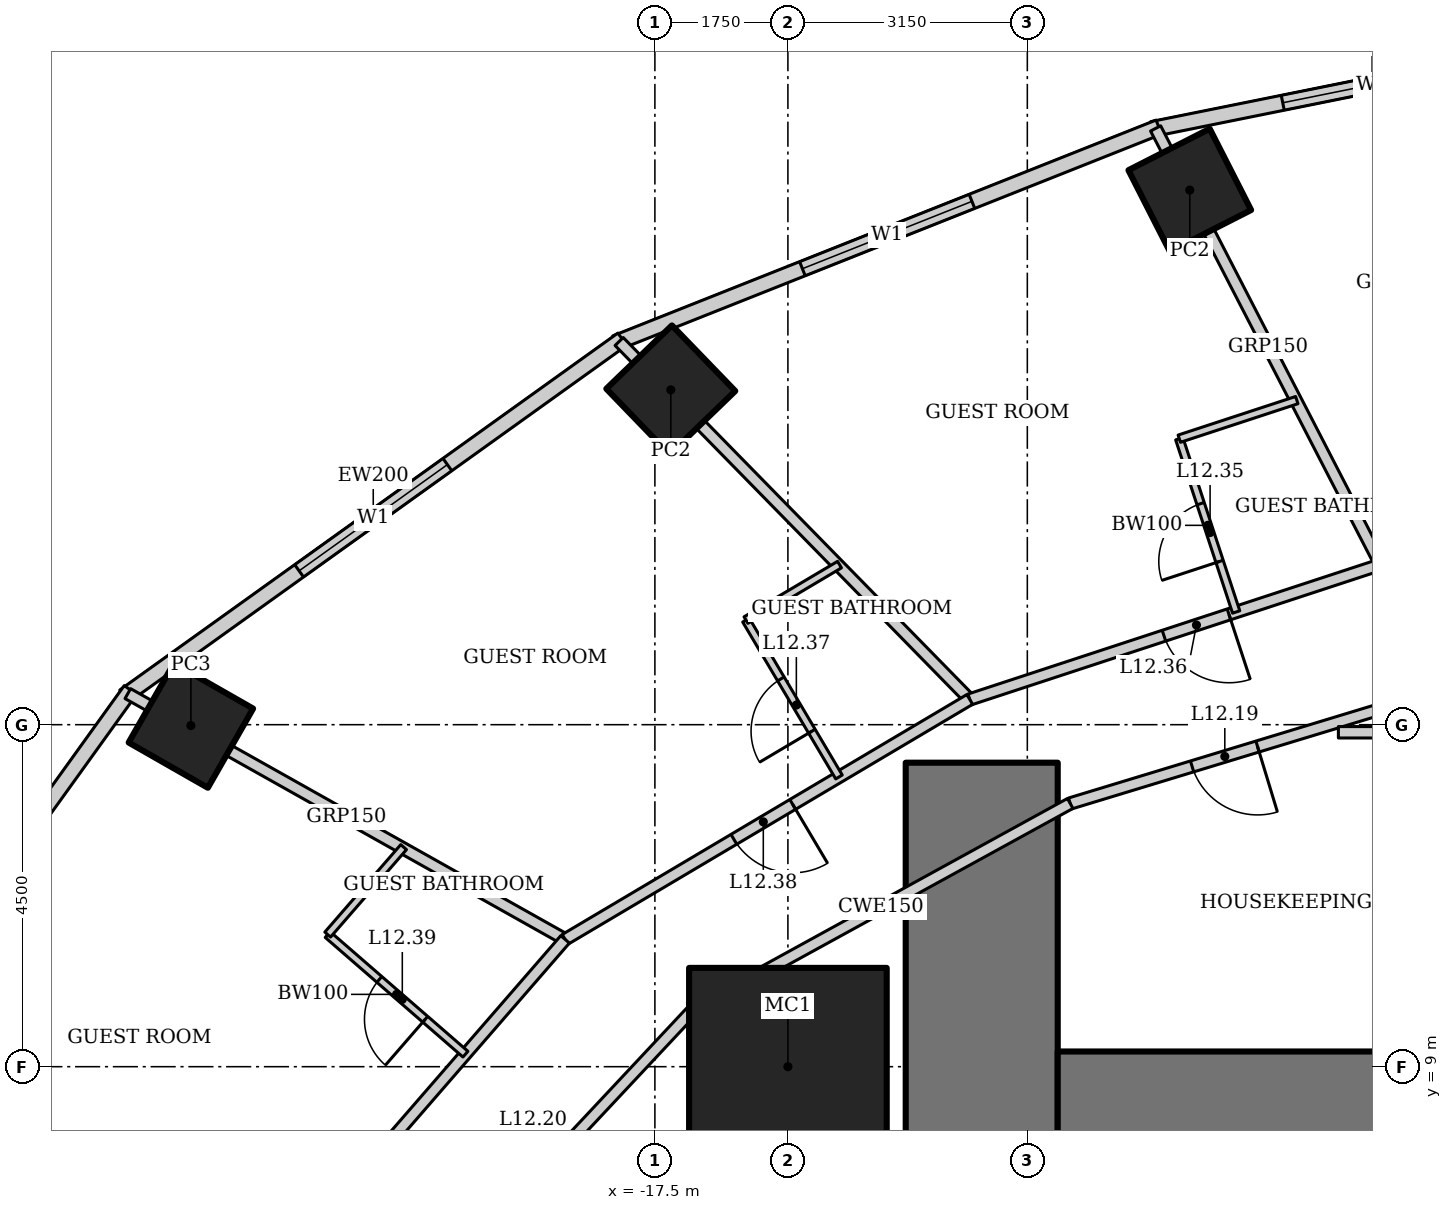
"""IFC4 building model, lengths in metres.
Left out: names, types, materials, properties, quantities, classifications, styles, units other than length and angle.
Written with IfcOpenShell. Run it as: python <this file> out.ifc"""

import sys

from ifc_helpers import new_model, si_unit, direction, frame, frame_2d, origin, origin_2d, place, context, subcontext, project, spatial, rectangle, hollow_rectangle, extrude, element, fill, save


model = new_model("IFC4")
c1 = context("Model", 3, precision=1e-05, world=origin(), true_north=direction((0.0, 1.0)))
c2 = subcontext(c1, "Body", "Model", "MODEL_VIEW")
j1 = project(units=[si_unit("LENGTHUNIT", "METRE"), si_unit("PLANEANGLEUNIT", "RADIAN")], contexts=[c1])
p1 = place(None, origin())
s1 = spatial("IfcSite", under=j1, at=p1, CompositionType="ELEMENT")
p2 = place(p1, origin())
s2 = spatial("IfcBuilding", under=s1, at=p2, CompositionType="ELEMENT")
p3 = place(p2, frame((0.0, 0.0, 58.6)))
s3 = spatial("IfcBuildingStorey", under=s2, at=p3, CompositionType="ELEMENT", Elevation=58.6)
p4 = place(p3, frame((-15.75, 9.0, 0.0), z_axis=(0.0, 0.0, 1.0), x_axis=(1.0, 0.0, 0.0)))
e1 = element("IfcColumn", 1, at=p4, inside=s3, PredefinedType="COLUMN", context=c2, shape_type="SweptSolid", body=[
    extrude(hollow_rectangle(XDim=2.6, YDim=2.6, WallThickness=0.13, at=origin_2d()), origin(), (0.0, 0.0, 1.0), 3.6),
])
for number, where, z_axis, x_axis in (
    (2, (-10.463, 20.534, 0.0), (0.0, 0.0, 1.0), (0.891, 0.454, 0.0)),
    (3, (-17.291, 17.905, 0.0), (0.0, 0.0, 1.0), (0.719, 0.695, 0.0)),
):
    element("IfcColumn", number, at=place(p3, frame(where, z_axis=z_axis, x_axis=x_axis)), inside=s3, PredefinedType="COLUMN", context=c2, shape_type="SweptSolid", body=[
        extrude(hollow_rectangle(XDim=1.2, YDim=1.2, WallThickness=0.1, at=origin_2d()), origin(), (0.0, 0.0, 1.0), 3.6),
    ])
p5 = place(p3, frame((-23.605, 13.489, 0.0), z_axis=(0.0, 0.0, 1.0), x_axis=(0.496139221777, 0.86824298017, 0.0)))
e4 = element("IfcColumn", 4, at=p5, inside=s3, PredefinedType="COLUMN", context=c2, shape_type="SweptSolid", body=[
    extrude(hollow_rectangle(XDim=1.2, YDim=1.2, WallThickness=0.12, at=origin_2d()), origin(), (0.0, 0.0, 1.0), 3.6),
])
p6 = place(p3, frame((-13.2, 13.0, 0.0), z_axis=(0.0, 0.0, 1.0), x_axis=(0.0, -1.0, 0.0)))
e5 = element("IfcWall", 5, at=p6, inside=s3, PredefinedType="SHEAR", context=c2, shape_type="SweptSolid", body=[
    extrude(rectangle(XDim=26.0, YDim=2.0, at=frame_2d((13.0, 0.0))), origin(), (0.0, 0.0, 1.0), 3.6),
])
p7 = place(p6, frame((12.1, 0.0, 0.0)))
e6 = element("IfcOpeningElement", 6, at=p7, cuts=e5, PredefinedType="OPENING", context=c2, shape_type="SweptSolid", body=[
    extrude(rectangle(XDim=1.8, YDim=2.1, at=frame_2d((0.9, 1.05))), frame((0.0, 1.01, 0.0), z_axis=(0.0, -1.0, 0.0), x_axis=(1.0, 0.0, 0.0)), (0.0, 0.0, 1.0), 2.02),
])
p8 = place(p3, frame((12.2, 8.0, 0.0), z_axis=(0.0, 0.0, 1.0), x_axis=(-1.0, 0.0, 0.0)))
e7 = element("IfcWall", 7, at=p8, inside=s3, PredefinedType="SHEAR", context=c2, shape_type="SweptSolid", body=[
    extrude(rectangle(XDim=24.4, YDim=2.4, at=frame_2d((12.2, 0.0))), origin(), (0.0, 0.0, 1.0), 3.6),
])
p9 = place(p3, frame((-5.17, 22.504, 0.0), z_axis=(0.0, 0.0, 1.0), x_axis=(-0.980251657452, -0.197754110105, 0.0)))
e8 = element("IfcWall", 8, at=p9, inside=s3, PredefinedType="SOLIDWALL", context=c2, shape_type="SweptSolid", body=[
    extrude(rectangle(XDim=5.904, YDim=0.2, at=frame_2d((2.952, 0.0))), origin(), (0.0, 0.0, 1.0), 3.45),
])
p10 = place(p9, frame((1.752, 0.0, 0.5)))
e9 = element("IfcOpeningElement", 9, at=p10, cuts=e8, PredefinedType="OPENING", context=c2, shape_type="SweptSolid", body=[
    extrude(rectangle(XDim=2.4, YDim=2.2, at=frame_2d((1.2, 1.1))), frame((0.0, 0.11, 0.0), z_axis=(0.0, -1.0, 0.0), x_axis=(1.0, 0.0, 0.0)), (0.0, 0.0, 1.0), 0.22),
])
p11 = place(p3, frame((-10.869, 21.363, 0.0), z_axis=(0.0, 0.0, 1.0), x_axis=(-0.929358351251, -0.369178892895, 0.0)))
e10 = element("IfcWall", 10, at=p11, inside=s3, PredefinedType="SOLIDWALL", context=c2, shape_type="SweptSolid", body=[
    extrude(rectangle(XDim=7.692, YDim=0.2, at=frame_2d((3.846, 0.0))), origin(), (0.0, 0.0, 1.0), 3.45),
])
p12 = place(p11, frame((2.646, 0.0, 0.5)))
e11 = element("IfcOpeningElement", 11, at=p12, cuts=e10, PredefinedType="OPENING", context=c2, shape_type="SweptSolid", body=[
    extrude(rectangle(XDim=2.4, YDim=2.2, at=frame_2d((1.2, 1.1))), frame((0.0, 0.11, 0.0), z_axis=(0.0, -1.0, 0.0), x_axis=(1.0, 0.0, 0.0)), (0.0, 0.0, 1.0), 0.22),
])
p13 = place(p3, frame((-17.929, 18.572, 0.0), z_axis=(0.0, 0.0, 1.0), x_axis=(-0.812791321576, -0.582554948112, 0.0)))
e12 = element("IfcWall", 12, at=p13, inside=s3, PredefinedType="SOLIDWALL", context=c2, shape_type="SweptSolid", body=[
    extrude(rectangle(XDim=8.063, YDim=0.2, at=frame_2d((4.032, 0.0))), origin(), (0.0, 0.0, 1.0), 3.45),
])
p14 = place(p13, frame((2.832, 0.0, 0.5)))
e13 = element("IfcOpeningElement", 13, at=p14, cuts=e12, PredefinedType="OPENING", context=c2, shape_type="SweptSolid", body=[
    extrude(rectangle(XDim=2.4, YDim=2.2, at=frame_2d((1.2, 1.1))), frame((0.0, 0.11, 0.0), z_axis=(0.0, -1.0, 0.0), x_axis=(1.0, 0.0, 0.0)), (0.0, 0.0, 1.0), 0.22),
])
p15 = place(p3, frame((-24.4, 13.957, 0.0), z_axis=(0.0, 0.0, 1.0), x_axis=(-0.583937613703, -0.811798536155, 0.0)))
e14 = element("IfcWall", 14, at=p15, inside=s3, PredefinedType="SOLIDWALL", context=c2, shape_type="SweptSolid", body=[
    extrude(rectangle(XDim=8.323, YDim=0.2, at=frame_2d((4.162, 0.0))), origin(), (0.0, 0.0, 1.0), 3.45),
])
p16 = place(p15, frame((2.961, 0.0, 0.5)))
e15 = element("IfcOpeningElement", 15, at=p16, cuts=e14, PredefinedType="OPENING", context=c2, shape_type="SweptSolid", body=[
    extrude(rectangle(XDim=2.4, YDim=2.2, at=frame_2d((1.2, 1.1))), frame((0.0, 0.11, 0.0), z_axis=(0.0, -1.0, 0.0), x_axis=(1.0, 0.0, 0.0)), (0.0, 0.0, 1.0), 0.22),
])
p17 = place(p3, frame((-10.912, 21.346, 0.0), z_axis=(0.0, 0.0, 1.0), x_axis=(0.458384799126, -0.888753833145, 0.0)))
e16 = element("IfcWall", 16, at=p17, inside=s3, PredefinedType="PARTITIONING", context=c2, shape_type="SweptSolid", body=[
    extrude(rectangle(XDim=6.457, YDim=0.15, at=frame_2d((3.229, 0.0))), origin(), (0.0, 0.0, 1.0), 2.528),
])
p18 = place(p3, frame((-17.97, 18.542, 0.0), z_axis=(0.0, 0.0, 1.0), x_axis=(0.699736251994, -0.714401272147, 0.0)))
e17 = element("IfcWall", 17, at=p18, inside=s3, PredefinedType="PARTITIONING", context=c2, shape_type="SweptSolid", body=[
    extrude(rectangle(XDim=6.593, YDim=0.15, at=frame_2d((3.296, 0.0))), origin(), (0.0, 0.0, 1.0), 2.528),
])
p19 = place(p3, frame((-24.435, 13.909, 0.0), z_axis=(0.0, 0.0, 1.0), x_axis=(0.871747379892, -0.489955616001, 0.0)))
e18 = element("IfcWall", 18, at=p19, inside=s3, PredefinedType="PARTITIONING", context=c2, shape_type="SweptSolid", body=[
    extrude(rectangle(XDim=6.6, YDim=0.15, at=frame_2d((3.3, 0.0))), origin(), (0.0, 0.0, 1.0), 2.693),
])
p20 = place(p3, frame((-7.952, 15.607, 0.0), z_axis=(0.0, 0.0, 1.0), x_axis=(-0.950106803111, -0.311924770869, 0.0)))
e19 = element("IfcWall", 19, at=p20, inside=s3, PredefinedType="PARTITIONING", context=c2, shape_type="SweptSolid", body=[
    extrude(rectangle(XDim=5.689, YDim=0.15, at=frame_2d((2.845, 0.0))), origin(), (0.0, 0.0, 1.0), 3.45),
])
p21 = place(p20, frame((2.1, 0.0, 0.0)))
e20 = element("IfcOpeningElement", 20, at=p21, cuts=e19, PredefinedType="OPENING", context=c2, shape_type="SweptSolid", body=[
    extrude(rectangle(XDim=0.9, YDim=2.1, at=frame_2d((0.45, 1.05))), frame((0.0, 0.085, 0.0), z_axis=(0.0, -1.0, 0.0), x_axis=(1.0, 0.0, 0.0)), (0.0, 0.0, 1.0), 0.17),
])
p22 = place(p3, frame((-13.357, 13.832, 0.0), z_axis=(0.0, 0.0, 1.0), x_axis=(-0.860147339762, -0.510045639036, 0.0)))
e21 = element("IfcWall", 21, at=p22, inside=s3, PredefinedType="PARTITIONING", context=c2, shape_type="SweptSolid", body=[
    extrude(rectangle(XDim=6.19, YDim=0.15, at=frame_2d((3.095, 0.0))), origin(), (0.0, 0.0, 1.0), 3.45),
])
p23 = place(p22, frame((2.708, 0.0, 0.0)))
e22 = element("IfcOpeningElement", 22, at=p23, cuts=e21, PredefinedType="OPENING", context=c2, shape_type="SweptSolid", body=[
    extrude(rectangle(XDim=0.9, YDim=2.1, at=frame_2d((0.45, 1.05))), frame((0.0, 0.085, 0.0), z_axis=(0.0, -1.0, 0.0), x_axis=(1.0, 0.0, 0.0)), (0.0, 0.0, 1.0), 0.17),
])
p24 = place(p3, frame((-18.681, 10.675, 0.0), z_axis=(0.0, 0.0, 1.0), x_axis=(-0.655599989166, -0.755108372491, 0.0)))
e23 = element("IfcWall", 23, at=p24, inside=s3, PredefinedType="PARTITIONING", context=c2, shape_type="SweptSolid", body=[
    extrude(rectangle(XDim=6.551, YDim=0.15, at=frame_2d((3.275, 0.0))), origin(), (0.0, 0.0, 1.0), 3.45),
])
p25 = place(p24, frame((5.301, 0.0, 0.0)))
e24 = element("IfcOpeningElement", 24, at=p25, cuts=e23, PredefinedType="OPENING", context=c2, shape_type="SweptSolid", body=[
    extrude(rectangle(XDim=0.9, YDim=2.1, at=frame_2d((0.45, 1.05))), frame((0.0, 0.085, 0.0), z_axis=(0.0, -1.0, 0.0), x_axis=(1.0, 0.0, 0.0)), (0.0, 0.0, 1.0), 0.17),
])
p26 = place(p3, frame((-7.113, 13.96, 0.0), z_axis=(0.0, 0.0, 1.0), x_axis=(-0.956795045135, -0.290763205385, 0.0)))
e25 = element("IfcWall", 25, at=p26, inside=s3, PredefinedType="PARTITIONING", context=c2, shape_type="SweptSolid", body=[
    extrude(rectangle(XDim=5.146, YDim=0.15, at=frame_2d((2.573, 0.0))), origin(), (0.0, 0.0, 1.0), 3.45),
])
p27 = place(p26, frame((2.569, 0.0, 0.0)))
e26 = element("IfcOpeningElement", 26, at=p27, cuts=e25, PredefinedType="OPENING", context=c2, shape_type="SweptSolid", body=[
    extrude(rectangle(XDim=0.9, YDim=2.1, at=frame_2d((0.45, 1.05))), frame((0.0, 0.085, 0.0), z_axis=(0.0, -1.0, 0.0), x_axis=(1.0, 0.0, 0.0)), (0.0, 0.0, 1.0), 0.17),
])
p28 = place(p3, frame((-12.036, 12.464, 0.0), z_axis=(0.0, 0.0, 1.0), x_axis=(-0.876522084062, -0.481361647986, 0.0)))
e27 = element("IfcWall", 27, at=p28, inside=s3, PredefinedType="PARTITIONING", context=c2, shape_type="SweptSolid", body=[
    extrude(rectangle(XDim=5.687, YDim=0.15, at=frame_2d((2.844, 0.0))), origin(), (0.0, 0.0, 1.0), 3.45),
])
p29 = place(p3, frame((-17.021, 9.726, 0.0), z_axis=(0.0, 0.0, 1.0), x_axis=(-0.68365836236, -0.729802194828, 0.0)))
e28 = element("IfcWall", 28, at=p29, inside=s3, PredefinedType="PARTITIONING", context=c2, shape_type="SweptSolid", body=[
    extrude(rectangle(XDim=6.09, YDim=0.15, at=frame_2d((3.045, 0.0))), origin(), (0.0, 0.0, 1.0), 3.45),
])
p30 = place(p29, frame((2.545, 0.0, 0.0)))
e29 = element("IfcOpeningElement", 29, at=p30, cuts=e28, PredefinedType="OPENING", context=c2, shape_type="SweptSolid", body=[
    extrude(rectangle(XDim=1.0, YDim=2.1, at=frame_2d((0.5, 1.05))), frame((0.0, 0.085, 0.0), z_axis=(0.0, -1.0, 0.0), x_axis=(1.0, 0.0, 0.0)), (0.0, 0.0, 1.0), 0.17),
])
p31 = place(p3, frame((-4.56, 13.4, 0.0), z_axis=(0.0, 0.0, 1.0), x_axis=(-1.0, 0.0, 0.0)))
e30 = element("IfcWall", 30, at=p31, inside=s3, PredefinedType="PARTITIONING", context=c2, shape_type="SweptSolid", body=[
    extrude(rectangle(XDim=3.948, YDim=0.15, at=frame_2d((1.974, 0.0))), origin(), (0.0, 0.0, 1.0), 3.45),
])
p32 = place(p3, frame((-9.852, 14.983, 0.0), z_axis=(0.0, 0.0, 1.0), x_axis=(-0.311890952591, 0.950117905153, 0.0)))
e31 = element("IfcWall", 31, at=p32, inside=s3, PredefinedType="PARTITIONING", context=c2, shape_type="SweptSolid", body=[
    extrude(rectangle(XDim=2.4, YDim=0.1, at=frame_2d((1.2, 0.0))), origin(), (0.0, 0.0, 1.0), 3.45),
])
p33 = place(p32, frame((0.7, 0.0, 0.0)))
e32 = element("IfcOpeningElement", 32, at=p33, cuts=e31, PredefinedType="OPENING", context=c2, shape_type="SweptSolid", body=[
    extrude(rectangle(XDim=0.8, YDim=2.1, at=frame_2d((0.4, 1.05))), frame((0.0, 0.06, 0.0), z_axis=(0.0, -1.0, 0.0), x_axis=(1.0, 0.0, 0.0)), (0.0, 0.0, 1.0), 0.12),
])
p34 = place(p3, frame((-10.601, 17.263, 0.0), z_axis=(0.0, 0.0, 1.0), x_axis=(0.950113706819, 0.311903741746, 0.0)))
e33 = element("IfcWall", 33, at=p34, inside=s3, PredefinedType="PARTITIONING", context=c2, shape_type="SweptSolid", body=[
    extrude(rectangle(XDim=1.627, YDim=0.1, at=frame_2d((0.814, 0.0))), origin(), (0.0, 0.0, 1.0), 3.45),
])
p35 = place(p3, frame((-15.078, 12.812, 0.0), z_axis=(0.0, 0.0, 1.0), x_axis=(-0.510075642074, 0.860129548012, 0.0)))
e34 = element("IfcWall", 34, at=p35, inside=s3, PredefinedType="PARTITIONING", context=c2, shape_type="SweptSolid", body=[
    extrude(rectangle(XDim=2.4, YDim=0.1, at=frame_2d((1.2, 0.0))), origin(), (0.0, 0.0, 1.0), 3.45),
])
p36 = place(p35, frame((0.7, 0.0, 0.0)))
e35 = element("IfcOpeningElement", 35, at=p36, cuts=e34, PredefinedType="OPENING", context=c2, shape_type="SweptSolid", body=[
    extrude(rectangle(XDim=0.8, YDim=2.1, at=frame_2d((0.4, 1.05))), frame((0.0, 0.06, 0.0), z_axis=(0.0, -1.0, 0.0), x_axis=(1.0, 0.0, 0.0)), (0.0, 0.0, 1.0), 0.12),
])
p37 = place(p3, frame((-16.302, 14.876, 0.0), z_axis=(0.0, 0.0, 1.0), x_axis=(0.8601307696, 0.510073582131, 0.0)))
e36 = element("IfcWall", 36, at=p37, inside=s3, PredefinedType="PARTITIONING", context=c2, shape_type="SweptSolid", body=[
    extrude(rectangle(XDim=1.431, YDim=0.1, at=frame_2d((0.716, 0.0))), origin(), (0.0, 0.0, 1.0), 3.45),
])
p38 = place(p3, frame((-19.993, 9.165, 0.0), z_axis=(0.0, 0.0, 1.0), x_axis=(-0.755098052661, 0.655611875172, 0.0)))
e37 = element("IfcWall", 37, at=p38, inside=s3, PredefinedType="PARTITIONING", context=c2, shape_type="SweptSolid", body=[
    extrude(rectangle(XDim=2.4, YDim=0.1, at=frame_2d((1.2, 0.0))), origin(), (0.0, 0.0, 1.0), 3.45),
])
p39 = place(p38, frame((0.7, 0.0, 0.0)))
e38 = element("IfcOpeningElement", 38, at=p39, cuts=e37, PredefinedType="OPENING", context=c2, shape_type="SweptSolid", body=[
    extrude(rectangle(XDim=0.8, YDim=2.1, at=frame_2d((0.4, 1.05))), frame((0.0, 0.06, 0.0), z_axis=(0.0, -1.0, 0.0), x_axis=(1.0, 0.0, 0.0)), (0.0, 0.0, 1.0), 0.12),
])
p40 = place(p3, frame((-21.805, 10.738, 0.0), z_axis=(0.0, 0.0, 1.0), x_axis=(0.655528024617, 0.755170847518, 0.0)))
e39 = element("IfcWall", 39, at=p40, inside=s3, PredefinedType="PARTITIONING", context=c2, shape_type="SweptSolid", body=[
    extrude(rectangle(XDim=1.524, YDim=0.1, at=frame_2d((0.762, 0.0))), origin(), (0.0, 0.0, 1.0), 3.45),
])
p41 = place(p10, origin())
e40 = element("IfcWindow", 40, at=p41, inside=s3, PartitioningType="SINGLE_PANEL", PredefinedType="WINDOW", context=c2, shape_type="SweptSolid", body=[
    extrude(rectangle(XDim=2.4, YDim=2.2, at=frame_2d((1.2, 1.1))), frame((0.0, 0.03, 0.0), z_axis=(0.0, -1.0, 0.0), x_axis=(1.0, 0.0, 0.0)), (0.0, 0.0, 1.0), 0.06),
])
fill(e9, e40)
p42 = place(p12, origin())
e41 = element("IfcWindow", 41, at=p42, inside=s3, PartitioningType="SINGLE_PANEL", PredefinedType="WINDOW", context=c2, shape_type="SweptSolid", body=[
    extrude(rectangle(XDim=2.4, YDim=2.2, at=frame_2d((1.2, 1.1))), frame((0.0, 0.03, 0.0), z_axis=(0.0, -1.0, 0.0), x_axis=(1.0, 0.0, 0.0)), (0.0, 0.0, 1.0), 0.06),
])
fill(e11, e41)
p43 = place(p14, origin())
e42 = element("IfcWindow", 42, at=p43, inside=s3, PartitioningType="SINGLE_PANEL", PredefinedType="WINDOW", context=c2, shape_type="SweptSolid", body=[
    extrude(rectangle(XDim=2.4, YDim=2.2, at=frame_2d((1.2, 1.1))), frame((0.0, 0.03, 0.0), z_axis=(0.0, -1.0, 0.0), x_axis=(1.0, 0.0, 0.0)), (0.0, 0.0, 1.0), 0.06),
])
fill(e13, e42)
p44 = place(p27, origin())
e43 = element("IfcDoor", 43, at=p44, inside=s3, OperationType="SINGLE_SWING_LEFT", PredefinedType="DOOR", context=c2, shape_type="SweptSolid", body=[
    extrude(rectangle(XDim=0.9, YDim=2.1, at=frame_2d((0.45, 1.05))), frame((0.0, 0.025, 0.0), z_axis=(0.0, -1.0, 0.0), x_axis=(1.0, 0.0, 0.0)), (0.0, 0.0, 1.0), 0.05),
])
fill(e26, e43)
p45 = place(p33, origin())
e44 = element("IfcDoor", 44, at=p45, inside=s3, OperationType="SINGLE_SWING_LEFT", PredefinedType="DOOR", context=c2, shape_type="SweptSolid", body=[
    extrude(rectangle(XDim=0.8, YDim=2.1, at=frame_2d((0.4, 1.05))), frame((0.0, 0.025, 0.0), z_axis=(0.0, -1.0, 0.0), x_axis=(1.0, 0.0, 0.0)), (0.0, 0.0, 1.0), 0.05),
])
fill(e32, e44)
p46 = place(p21, origin())
e45 = element("IfcDoor", 45, at=p46, inside=s3, OperationType="SINGLE_SWING_LEFT", PredefinedType="DOOR", context=c2, shape_type="SweptSolid", body=[
    extrude(rectangle(XDim=0.9, YDim=2.1, at=frame_2d((0.45, 1.05))), frame((0.0, 0.025, 0.0), z_axis=(0.0, -1.0, 0.0), x_axis=(1.0, 0.0, 0.0)), (0.0, 0.0, 1.0), 0.05),
])
fill(e20, e45)
p47 = place(p36, origin())
e46 = element("IfcDoor", 46, at=p47, inside=s3, OperationType="SINGLE_SWING_LEFT", PredefinedType="DOOR", context=c2, shape_type="SweptSolid", body=[
    extrude(rectangle(XDim=0.8, YDim=2.1, at=frame_2d((0.4, 1.05))), frame((0.0, 0.025, 0.0), z_axis=(0.0, -1.0, 0.0), x_axis=(1.0, 0.0, 0.0)), (0.0, 0.0, 1.0), 0.05),
])
fill(e35, e46)
p48 = place(p23, origin())
e47 = element("IfcDoor", 47, at=p48, inside=s3, OperationType="SINGLE_SWING_LEFT", PredefinedType="DOOR", context=c2, shape_type="SweptSolid", body=[
    extrude(rectangle(XDim=0.9, YDim=2.1, at=frame_2d((0.45, 1.05))), frame((0.0, 0.025, 0.0), z_axis=(0.0, -1.0, 0.0), x_axis=(1.0, 0.0, 0.0)), (0.0, 0.0, 1.0), 0.05),
])
fill(e22, e47)
p49 = place(p39, origin())
e48 = element("IfcDoor", 48, at=p49, inside=s3, OperationType="SINGLE_SWING_LEFT", PredefinedType="DOOR", context=c2, shape_type="SweptSolid", body=[
    extrude(rectangle(XDim=0.8, YDim=2.1, at=frame_2d((0.4, 1.05))), frame((0.0, 0.025, 0.0), z_axis=(0.0, -1.0, 0.0), x_axis=(1.0, 0.0, 0.0)), (0.0, 0.0, 1.0), 0.05),
])
fill(e38, e48)
save(model, sys.argv[1])
